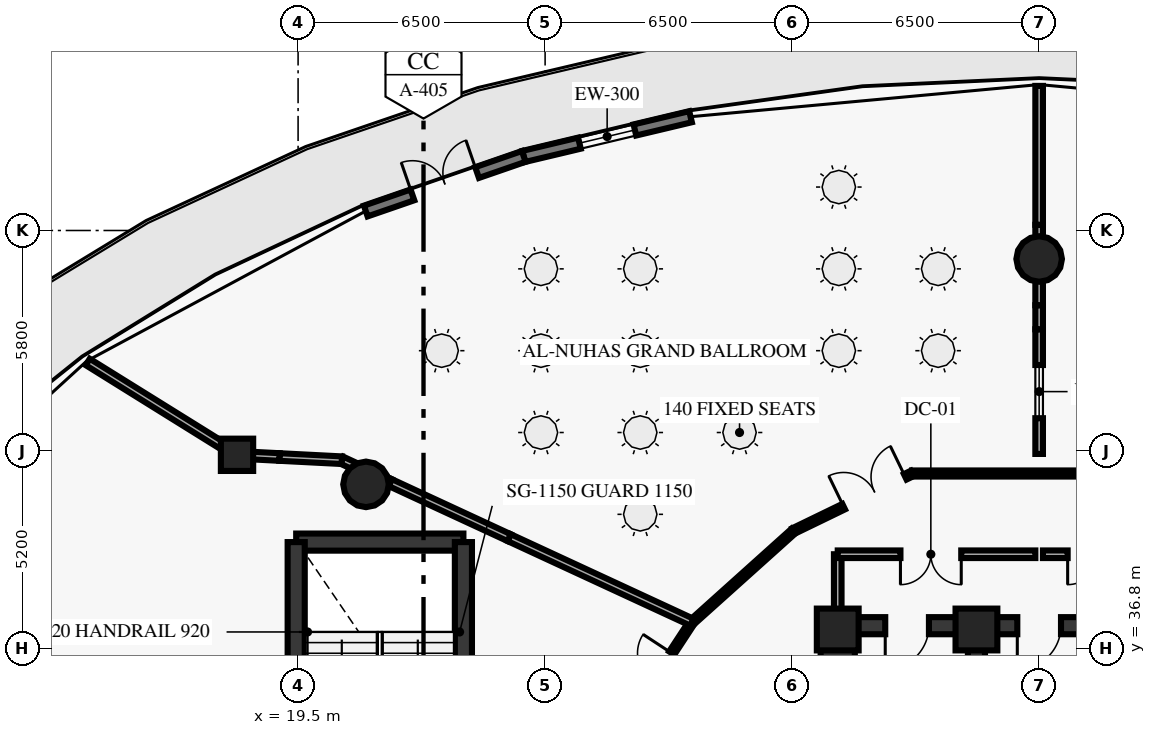
"""IFC4 building model, lengths in metres.
Left out: names, types, materials, properties, quantities, classifications, styles, units other than length and angle.
Written with IfcOpenShell. Run it as: python <this file> out.ifc"""

import sys

from ifc_helpers import new_model, si_unit, direction, frame, frame_2d, origin, origin_2d, place, context, subcontext, project, spatial, rectangle, circle, extrude, element, fill, save


model = new_model("IFC4")
c1 = context("Model", 3, precision=1e-05, world=origin(), true_north=direction((0.0, 1.0)))
c2 = subcontext(c1, "Body", "Model", "MODEL_VIEW")
j1 = project(units=[si_unit("LENGTHUNIT", "METRE"), si_unit("PLANEANGLEUNIT", "RADIAN")], contexts=[c1])
p1 = place(None, origin())
s1 = spatial("IfcSite", under=j1, at=p1, CompositionType="ELEMENT")
p2 = place(p1, origin())
s2 = spatial("IfcBuilding", under=s1, at=p2, CompositionType="ELEMENT")
p3 = place(p2, frame((0.0, 0.0, 11.0)))
s3 = spatial("IfcBuildingStorey", under=s2, at=p3, CompositionType="ELEMENT", Elevation=11.0)
for number, where, z_axis, x_axis in (
    (1, (37.35, 37.3, 0.0), (0.0, 0.0, 1.0), (1.0, 0.0, 0.0)),
    (2, (33.7, 37.3, 0.0), (0.0, 0.0, 1.0), (1.0, 0.0, 0.0)),
):
    element("IfcColumn", number, at=place(p3, frame(where, z_axis=z_axis, x_axis=x_axis)), inside=s3, PredefinedType="PILASTER", context=c2, shape_type="SweptSolid", body=[
        extrude(rectangle(XDim=1.1, YDim=1.1, at=origin_2d()), origin(), (0.0, 0.0, 1.0), 4.7),
    ])
for number, where, z_axis, x_axis in (
    (3, (39.0, 47.05, 0.0), (0.0, 0.0, 1.0), (1.0, 0.0, 0.0)),
    (4, (21.287, 41.119, 0.0), (0.0, 0.0, 1.0), (1.0, 0.0, 0.0)),
):
    element("IfcColumn", number, at=place(p3, frame(where, z_axis=z_axis, x_axis=x_axis)), inside=s3, PredefinedType="COLUMN", context=c2, shape_type="SweptSolid", body=[
        extrude(circle(Radius=0.6, at=origin_2d()), origin(), (0.0, 0.0, 1.0), 4.7),
    ])
p4 = place(p3, frame((17.893, 41.897, 0.0), z_axis=(0.0, 0.0, 1.0), x_axis=(1.0, 0.0, 0.0)))
e5 = element("IfcColumn", 5, at=p4, inside=s3, PredefinedType="COLUMN", context=c2, shape_type="SweptSolid", body=[
    extrude(rectangle(XDim=0.85, YDim=0.85, at=origin_2d()), origin(), (0.0, 0.0, 1.0), 4.7),
])
p5 = place(p3, frame((33.7, 29.05, 0.0), z_axis=(0.0, 0.0, 1.0), x_axis=(0.0, 1.0, 0.0)))
e6 = element("IfcWall", 6, at=p5, inside=s3, PredefinedType="SHEAR", context=c2, shape_type="SweptSolid", body=[
    extrude(rectangle(XDim=8.35, YDim=0.9, at=frame_2d((4.175, 0.0))), origin(), (0.0, 0.0, 1.0), 4.7),
])
p6 = place(p3, frame((25.438, 49.749, 0.0), z_axis=(0.0, 0.0, 1.0), x_axis=(0.972809117726, 0.231608334197, 0.0)))
e7 = element("IfcWall", 7, at=p6, inside=s3, PredefinedType="STANDARD", context=c2, shape_type="SweptSolid", body=[
    extrude(rectangle(XDim=4.511, YDim=0.3, at=frame_2d((2.256, 0.0))), origin(), (0.0, 0.0, 1.0), 4.7),
])
p7 = place(p6, frame((1.506, 0.0, 0.9)))
e8 = element("IfcOpeningElement", 8, at=p7, cuts=e7, PredefinedType="OPENING", context=c2, shape_type="SweptSolid", body=[
    extrude(rectangle(XDim=1.5, YDim=2.2, at=frame_2d((0.75, 1.1))), frame((0.0, 0.16, 0.0), z_axis=(0.0, -1.0, 0.0), x_axis=(1.0, 0.0, 0.0)), (0.0, 0.0, 1.0), 0.32),
])
p8 = place(p3, frame((21.28, 48.312, 0.0), z_axis=(0.0, 0.0, 1.0), x_axis=(0.945146288822, 0.32664735224, 0.0)))
e9 = element("IfcWall", 9, at=p8, inside=s3, PredefinedType="STANDARD", context=c2, shape_type="SweptSolid", body=[
    extrude(rectangle(XDim=4.399, YDim=0.3, at=frame_2d((2.2, 0.0))), origin(), (0.0, 0.0, 1.0), 4.7),
])
p9 = place(p8, frame((1.3, 0.0, 0.0)))
e10 = element("IfcOpeningElement", 10, at=p9, cuts=e9, PredefinedType="OPENING", context=c2, shape_type="SweptSolid", body=[
    extrude(rectangle(XDim=1.8, YDim=2.25, at=frame_2d((0.9, 1.125))), frame((0.0, 0.16, 0.0), z_axis=(0.0, -1.0, 0.0), x_axis=(1.0, 0.0, 0.0)), (0.0, 0.0, 1.0), 0.32),
])
p10 = place(p3, frame((37.35, 37.4, 0.0), z_axis=(0.0, 0.0, 1.0), x_axis=(-1.0, 0.0, 0.0)))
e11 = element("IfcWall", 11, at=p10, inside=s3, PredefinedType="SHEAR", context=c2, shape_type="SweptSolid", body=[
    extrude(rectangle(XDim=3.65, YDim=0.45, at=frame_2d((1.825, 0.0))), origin(), (0.0, 0.0, 1.0), 4.7),
])
p11 = place(p10, frame((1.25, 0.0, 0.0)))
e12 = element("IfcOpeningElement", 12, at=p11, cuts=e11, PredefinedType="OPENING", context=c2, shape_type="SweptSolid", body=[
    extrude(rectangle(XDim=1.15, YDim=2.15, at=frame_2d((0.575, 1.075))), frame((0.0, 0.235, 0.0), z_axis=(0.0, -1.0, 0.0), x_axis=(1.0, 0.0, 0.0)), (0.0, 0.0, 1.0), 0.47),
])
p12 = place(p3, frame((37.35, 29.05, 0.0), z_axis=(0.0, 0.0, 1.0), x_axis=(0.0, 1.0, 0.0)))
e13 = element("IfcWall", 13, at=p12, inside=s3, PredefinedType="SHEAR", context=c2, shape_type="SweptSolid", body=[
    extrude(rectangle(XDim=8.35, YDim=0.45, at=frame_2d((4.175, 0.0))), origin(), (0.0, 0.0, 1.0), 4.7),
])
p13 = place(p3, frame((40.65, 37.4, 0.0), z_axis=(0.0, 0.0, 1.0), x_axis=(-1.0, 0.0, 0.0)))
e14 = element("IfcWall", 14, at=p13, inside=s3, PredefinedType="SHEAR", context=c2, shape_type="SweptSolid", body=[
    extrude(rectangle(XDim=3.3, YDim=0.45, at=frame_2d((1.65, 0.0))), origin(), (0.0, 0.0, 1.0), 4.7),
])
p14 = place(p13, frame((1.075, 0.0, 0.0)))
e15 = element("IfcOpeningElement", 15, at=p14, cuts=e14, PredefinedType="OPENING", context=c2, shape_type="SweptSolid", body=[
    extrude(rectangle(XDim=1.15, YDim=2.15, at=frame_2d((0.575, 1.075))), frame((0.0, 0.235, 0.0), z_axis=(0.0, -1.0, 0.0), x_axis=(1.0, 0.0, 0.0)), (0.0, 0.0, 1.0), 0.47),
])
p15 = place(p3, frame((19.45, 39.6, 0.0), z_axis=(0.0, 0.0, 1.0), x_axis=(1.0, 0.0, 0.0)))
e16 = element("IfcWall", 16, at=p15, inside=s3, PredefinedType="SHEAR", context=c2, shape_type="SweptSolid", body=[
    extrude(rectangle(XDim=4.4, YDim=0.45, at=frame_2d((2.2, 0.0))), origin(), (0.0, 0.0, 1.0), 4.7),
])
for number, where, z_axis, x_axis in (
    (17, (19.45, 31.7, 0.0), (0.0, 0.0, 1.0), (0.0, 1.0, 0.0)),
    (18, (23.85, 31.7, 0.0), (0.0, 0.0, 1.0), (0.0, 1.0, 0.0)),
):
    element("IfcWall", number, at=place(p3, frame(where, z_axis=z_axis, x_axis=x_axis)), inside=s3, PredefinedType="SHEAR", context=c2, shape_type="SweptSolid", body=[
        extrude(rectangle(XDim=7.9, YDim=0.45, at=frame_2d((3.95, 0.0))), origin(), (0.0, 0.0, 1.0), 4.7),
    ])
p16 = place(p3, frame((33.7, 37.4, 0.0), z_axis=(0.0, 0.0, 1.0), x_axis=(0.0, 1.0, 0.0)))
e19 = element("IfcWall", 19, at=p16, inside=s3, PredefinedType="SOLIDWALL", context=c2, shape_type="SweptSolid", body=[
    extrude(rectangle(XDim=1.88, YDim=0.2, at=frame_2d((0.94, 0.0))), origin(), (0.0, 0.0, 1.0), 4.7),
])
p17 = place(p3, frame((38.9, 39.28, 0.0), z_axis=(0.0, 0.0, 1.0), x_axis=(-1.0, 0.0, 0.0)))
e20 = element("IfcWall", 20, at=p17, inside=s3, PredefinedType="SOLIDWALL", context=c2, shape_type="SweptSolid", body=[
    extrude(rectangle(XDim=5.2, YDim=0.2, at=frame_2d((2.6, 0.0))), origin(), (0.0, 0.0, 1.0), 4.7),
])
p18 = place(p17, frame((1.95, 0.0, 0.0)))
e21 = element("IfcOpeningElement", 21, at=p18, cuts=e20, PredefinedType="OPENING", context=c2, shape_type="SweptSolid", body=[
    extrude(rectangle(XDim=1.6, YDim=2.2, at=frame_2d((0.8, 1.1))), frame((0.0, 0.11, 0.0), z_axis=(0.0, -1.0, 0.0), x_axis=(1.0, 0.0, 0.0)), (0.0, 0.0, 1.0), 0.22),
])
p19 = place(p3, frame((45.7, 39.28, 0.0), z_axis=(0.0, 0.0, 1.0), x_axis=(-1.0, 0.0, 0.0)))
e22 = element("IfcWall", 22, at=p19, inside=s3, PredefinedType="SOLIDWALL", context=c2, shape_type="SweptSolid", body=[
    extrude(rectangle(XDim=6.6, YDim=0.2, at=frame_2d((3.3, 0.0))), origin(), (0.0, 0.0, 1.0), 4.7),
])
p20 = place(p19, frame((4.35, 0.0, 0.0)))
e23 = element("IfcOpeningElement", 23, at=p20, cuts=e22, PredefinedType="OPENING", context=c2, shape_type="SweptSolid", body=[
    extrude(rectangle(XDim=1.6, YDim=2.2, at=frame_2d((0.8, 1.1))), frame((0.0, 0.11, 0.0), z_axis=(0.0, -1.0, 0.0), x_axis=(1.0, 0.0, 0.0)), (0.0, 0.0, 1.0), 0.22),
])
p21 = place(p3, frame((42.344, 41.405, 0.0), z_axis=(0.0, 0.0, 1.0), x_axis=(-1.0, 0.0, 0.0)))
e24 = element("IfcWall", 24, at=p21, inside=s3, PredefinedType="PARTITIONING", context=c2, shape_type="SweptSolid", body=[
    extrude(rectangle(XDim=6.688, YDim=0.16, at=frame_2d((3.344, 0.0))), origin(), (0.0, 0.0, 1.0), 4.7),
])
p22 = place(p3, frame((32.54, 39.894, 0.0), z_axis=(0.0, 0.0, 1.0), x_axis=(0.899789784655, 0.436323668199, 0.0)))
e25 = element("IfcWall", 25, at=p22, inside=s3, PredefinedType="PARTITIONING", context=c2, shape_type="SweptSolid", body=[
    extrude(rectangle(XDim=3.463, YDim=0.16, at=frame_2d((1.731, 0.0))), origin(), (0.0, 0.0, 1.0), 4.7),
])
p23 = place(p22, frame((1.463, 0.0, 0.0)))
e26 = element("IfcOpeningElement", 26, at=p23, cuts=e25, PredefinedType="OPENING", context=c2, shape_type="SweptSolid", body=[
    extrude(rectangle(XDim=1.8, YDim=2.3, at=frame_2d((0.9, 1.15))), frame((0.0, 0.09, 0.0), z_axis=(0.0, -1.0, 0.0), x_axis=(1.0, 0.0, 0.0)), (0.0, 0.0, 1.0), 0.18),
])
p24 = place(p3, frame((32.54, 39.894, 0.0), z_axis=(0.0, 0.0, 1.0), x_axis=(-0.744032872127, -0.668143012531, 0.0)))
e27 = element("IfcWall", 27, at=p24, inside=s3, PredefinedType="PARTITIONING", context=c2, shape_type="SweptSolid", body=[
    extrude(rectangle(XDim=3.597, YDim=0.16, at=frame_2d((1.798, 0.0))), origin(), (0.0, 0.0, 1.0), 4.7),
])
p25 = place(p3, frame((27.811, 34.36, 0.0), z_axis=(0.0, 0.0, 1.0), x_axis=(0.548348738977, 0.836249759619, 0.0)))
e28 = element("IfcWall", 28, at=p25, inside=s3, PredefinedType="PARTITIONING", context=c2, shape_type="SweptSolid", body=[
    extrude(rectangle(XDim=3.744, YDim=0.16, at=frame_2d((1.872, 0.0))), origin(), (0.0, 0.0, 1.0), 4.7),
])
p26 = place(p25, frame((0.972, 0.0, 0.0)))
e29 = element("IfcOpeningElement", 29, at=p26, cuts=e28, PredefinedType="OPENING", context=c2, shape_type="SweptSolid", body=[
    extrude(rectangle(XDim=1.8, YDim=2.3, at=frame_2d((0.9, 1.15))), frame((0.0, 0.09, 0.0), z_axis=(0.0, -1.0, 0.0), x_axis=(1.0, 0.0, 0.0)), (0.0, 0.0, 1.0), 0.18),
])
p27 = place(p3, frame((39.0, 41.92, 0.0), z_axis=(0.0, 0.0, 1.0), x_axis=(0.0, 1.0, 0.0)))
e30 = element("IfcWall", 30, at=p27, inside=s3, PredefinedType="SOLIDWALL", context=c2, shape_type="SweptSolid", body=[
    extrude(rectangle(XDim=3.28, YDim=0.2, at=frame_2d((1.64, 0.0))), origin(), (0.0, 0.0, 1.0), 4.7),
])
p28 = place(p27, frame((0.94, 0.0, 1.0)))
e31 = element("IfcOpeningElement", 31, at=p28, cuts=e30, PredefinedType="OPENING", context=c2, shape_type="SweptSolid", body=[
    extrude(rectangle(XDim=1.4, YDim=1.2, at=frame_2d((0.7, 0.6))), frame((0.0, 0.11, 0.0), z_axis=(0.0, -1.0, 0.0), x_axis=(1.0, 0.0, 0.0)), (0.0, 0.0, 1.0), 0.22),
])
p29 = place(p3, frame((39.0, 45.2, 0.0), z_axis=(0.0, 0.0, 1.0), x_axis=(0.0, 1.0, 0.0)))
e32 = element("IfcWall", 32, at=p29, inside=s3, PredefinedType="SOLIDWALL", context=c2, shape_type="SweptSolid", body=[
    extrude(rectangle(XDim=0.633, YDim=0.2, at=frame_2d((0.316, 0.0))), origin(), (0.0, 0.0, 1.0), 4.7),
])
p30 = place(p3, frame((39.0, 45.833, 0.0), z_axis=(0.0, 0.0, 1.0), x_axis=(0.0, 1.0, 0.0)))
e33 = element("IfcWall", 33, at=p30, inside=s3, PredefinedType="SOLIDWALL", context=c2, shape_type="SweptSolid", body=[
    extrude(rectangle(XDim=1.234, YDim=0.2, at=frame_2d((0.617, 0.0))), origin(), (0.0, 0.0, 1.0), 4.165),
])
p31 = place(p3, frame((39.0, 47.067, 0.0), z_axis=(0.0, 0.0, 1.0), x_axis=(0.0, 1.0, 0.0)))
e34 = element("IfcWall", 34, at=p31, inside=s3, PredefinedType="SOLIDWALL", context=c2, shape_type="SweptSolid", body=[
    extrude(rectangle(XDim=0.883, YDim=0.2, at=frame_2d((0.441, 0.0))), origin(), (0.0, 0.0, 1.0), 4.7),
])
p32 = place(p3, frame((39.0, 47.95, 0.0), z_axis=(0.0, 0.0, 1.0), x_axis=(0.0, 1.0, 0.0)))
e35 = element("IfcWall", 35, at=p32, inside=s3, PredefinedType="SOLIDWALL", context=c2, shape_type="SweptSolid", body=[
    extrude(rectangle(XDim=3.655, YDim=0.2, at=frame_2d((1.828, 0.0))), origin(), (0.0, 0.0, 1.0), 4.7),
])
p33 = place(p3, frame((29.864, 37.491, 0.0), z_axis=(0.0, 0.0, 1.0), x_axis=(-0.907524785669, 0.419998527851, 0.0)))
e36 = element("IfcWall", 36, at=p33, inside=s3, PredefinedType="PARTITIONING", context=c2, shape_type="SweptSolid", body=[
    extrude(rectangle(XDim=5.3, YDim=0.2, at=frame_2d((2.65, 0.0))), origin(), (0.0, 0.0, 1.0), 4.7),
])
p34 = place(p3, frame((25.054, 39.717, 0.0), z_axis=(0.0, 0.0, 1.0), x_axis=(-0.90747190463, 0.420112773321, 0.0)))
e37 = element("IfcWall", 37, at=p34, inside=s3, PredefinedType="PARTITIONING", context=c2, shape_type="SweptSolid", body=[
    extrude(rectangle(XDim=3.449, YDim=0.2, at=frame_2d((1.725, 0.0))), origin(), (0.0, 0.0, 1.0), 3.92),
])
p35 = place(p3, frame((21.924, 41.166, 0.0), z_axis=(0.0, 0.0, 1.0), x_axis=(-0.907622896373, 0.419786467124, 0.0)))
e38 = element("IfcWall", 38, at=p35, inside=s3, PredefinedType="PARTITIONING", context=c2, shape_type="SweptSolid", body=[
    extrude(rectangle(XDim=1.403, YDim=0.2, at=frame_2d((0.701, 0.0))), origin(), (0.0, 0.0, 1.0), 4.7),
])
p36 = place(p3, frame((20.651, 41.755, 0.0), z_axis=(0.0, 0.0, 1.0), x_axis=(-0.998685128887, 0.051264152576, 0.0)))
e39 = element("IfcWall", 39, at=p36, inside=s3, PredefinedType="PARTITIONING", context=c2, shape_type="SweptSolid", body=[
    extrude(rectangle(XDim=1.643, YDim=0.2, at=frame_2d((0.822, 0.0))), origin(), (0.0, 0.0, 1.0), 4.7),
])
p37 = place(p3, frame((19.01, 41.839, 0.0), z_axis=(0.0, 0.0, 1.0), x_axis=(-0.998660904733, 0.051733909163, 0.0)))
e40 = element("IfcWall", 40, at=p37, inside=s3, PredefinedType="PARTITIONING", context=c2, shape_type="SweptSolid", body=[
    extrude(rectangle(XDim=1.118, YDim=0.2, at=frame_2d((0.559, 0.0))), origin(), (0.0, 0.0, 1.0), 4.24),
])
p38 = place(p3, frame((17.893, 41.897, 0.0), z_axis=(0.0, 0.0, 1.0), x_axis=(-0.849149708827, 0.528152224267, 0.0)))
e41 = element("IfcWall", 41, at=p38, inside=s3, PredefinedType="PARTITIONING", context=c2, shape_type="SweptSolid", body=[
    extrude(rectangle(XDim=4.626, YDim=0.2, at=frame_2d((2.313, 0.0))), origin(), (0.0, 0.0, 1.0), 4.7),
])
p39 = place(p7, origin())
e42 = element("IfcWindow", 42, at=p39, inside=s3, PartitioningType="DOUBLE_PANEL_VERTICAL", PredefinedType="WINDOW", context=c2, shape_type="SweptSolid", body=[
    extrude(rectangle(XDim=1.5, YDim=2.2, at=frame_2d((0.75, 1.1))), frame((0.0, 0.03, 0.0), z_axis=(0.0, -1.0, 0.0), x_axis=(1.0, 0.0, 0.0)), (0.0, 0.0, 1.0), 0.06),
])
fill(e8, e42)
p40 = place(p9, origin())
e43 = element("IfcDoor", 43, at=p40, inside=s3, OperationType="DOUBLE_DOOR_SINGLE_SWING", PredefinedType="DOOR", context=c2, shape_type="SweptSolid", body=[
    extrude(rectangle(XDim=1.8, YDim=2.25, at=frame_2d((0.9, 1.125))), frame((0.0, 0.025, 0.0), z_axis=(0.0, -1.0, 0.0), x_axis=(1.0, 0.0, 0.0)), (0.0, 0.0, 1.0), 0.05),
])
fill(e10, e43)
p41 = place(p11, origin())
e44 = element("IfcDoor", 44, at=p41, inside=s3, OperationType="SINGLE_SWING_RIGHT", PredefinedType="DOOR", context=c2, shape_type="SweptSolid", body=[
    extrude(rectangle(XDim=1.15, YDim=2.15, at=frame_2d((0.575, 1.075))), frame((0.0, 0.025, 0.0), z_axis=(0.0, -1.0, 0.0), x_axis=(1.0, 0.0, 0.0)), (0.0, 0.0, 1.0), 0.05),
])
fill(e12, e44)
p42 = place(p14, origin())
e45 = element("IfcDoor", 45, at=p42, inside=s3, OperationType="SINGLE_SWING_RIGHT", PredefinedType="DOOR", context=c2, shape_type="SweptSolid", body=[
    extrude(rectangle(XDim=1.15, YDim=2.15, at=frame_2d((0.575, 1.075))), frame((0.0, 0.025, 0.0), z_axis=(0.0, -1.0, 0.0), x_axis=(1.0, 0.0, 0.0)), (0.0, 0.0, 1.0), 0.05),
])
fill(e15, e45)
p43 = place(p18, origin())
e46 = element("IfcDoor", 46, at=p43, inside=s3, OperationType="DOUBLE_DOOR_SINGLE_SWING", PredefinedType="DOOR", context=c2, shape_type="SweptSolid", body=[
    extrude(rectangle(XDim=1.6, YDim=2.2, at=frame_2d((0.8, 1.1))), frame((0.0, 0.025, 0.0), z_axis=(0.0, -1.0, 0.0), x_axis=(1.0, 0.0, 0.0)), (0.0, 0.0, 1.0), 0.05),
])
fill(e21, e46)
p44 = place(p20, origin())
e47 = element("IfcDoor", 47, at=p44, inside=s3, OperationType="DOUBLE_DOOR_SINGLE_SWING", PredefinedType="DOOR", context=c2, shape_type="SweptSolid", body=[
    extrude(rectangle(XDim=1.6, YDim=2.2, at=frame_2d((0.8, 1.1))), frame((0.0, 0.025, 0.0), z_axis=(0.0, -1.0, 0.0), x_axis=(1.0, 0.0, 0.0)), (0.0, 0.0, 1.0), 0.05),
])
fill(e23, e47)
p45 = place(p23, origin())
e48 = element("IfcDoor", 48, at=p45, inside=s3, OperationType="DOUBLE_DOOR_SINGLE_SWING", PredefinedType="DOOR", context=c2, shape_type="SweptSolid", body=[
    extrude(rectangle(XDim=1.8, YDim=2.3, at=frame_2d((0.9, 1.15))), frame((0.0, 0.025, 0.0), z_axis=(0.0, -1.0, 0.0), x_axis=(1.0, 0.0, 0.0)), (0.0, 0.0, 1.0), 0.05),
])
fill(e26, e48)
p46 = place(p26, origin())
e49 = element("IfcDoor", 49, at=p46, inside=s3, OperationType="DOUBLE_DOOR_SINGLE_SWING", PredefinedType="DOOR", context=c2, shape_type="SweptSolid", body=[
    extrude(rectangle(XDim=1.8, YDim=2.3, at=frame_2d((0.9, 1.15))), frame((0.0, 0.025, 0.0), z_axis=(0.0, -1.0, 0.0), x_axis=(1.0, 0.0, 0.0)), (0.0, 0.0, 1.0), 0.05),
])
fill(e29, e49)
p47 = place(p28, origin())
e50 = element("IfcWindow", 50, at=p47, inside=s3, PartitioningType="SINGLE_PANEL", PredefinedType="WINDOW", context=c2, shape_type="SweptSolid", body=[
    extrude(rectangle(XDim=1.4, YDim=1.2, at=frame_2d((0.7, 0.6))), frame((0.0, 0.03, 0.0), z_axis=(0.0, -1.0, 0.0), x_axis=(1.0, 0.0, 0.0)), (0.0, 0.0, 1.0), 0.06),
])
fill(e31, e50)
save(model, sys.argv[1])
